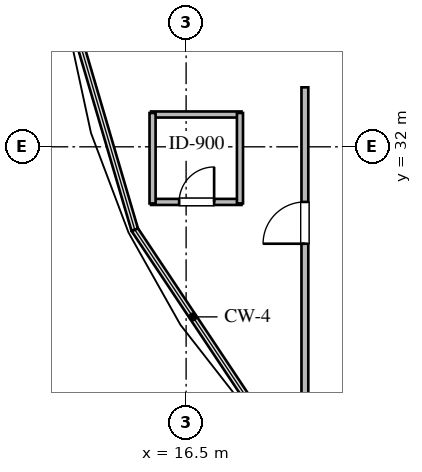
"""IFC4 building model, lengths in metres.
Left out: names, types, materials, properties, quantities, classifications, styles, units other than length and angle.
Written with IfcOpenShell. Run it as: python <this file> out.ifc"""

import sys

from ifc_helpers import new_model, si_unit, direction, frame, frame_2d, origin, place, context, subcontext, project, spatial, rectangle, extrude, element, fill, save


model = new_model("IFC4")
c1 = context("Model", 3, precision=1e-05, world=origin(), true_north=direction((0.0, 1.0)))
c2 = subcontext(c1, "Body", "Model", "MODEL_VIEW")
j1 = project(units=[si_unit("LENGTHUNIT", "METRE"), si_unit("PLANEANGLEUNIT", "RADIAN")], contexts=[c1])
p1 = place(None, origin())
s1 = spatial("IfcSite", under=j1, at=p1, CompositionType="ELEMENT")
p2 = place(p1, origin())
s2 = spatial("IfcBuilding", under=s1, at=p2, CompositionType="ELEMENT")
p3 = place(p2, frame((0.0, 0.0, 199.2)))
s3 = spatial("IfcBuildingStorey", under=s2, at=p3, CompositionType="ELEMENT", Elevation=199.2)
p4 = place(p3, frame((15.577, 30.55, 0.0), z_axis=(0.0, 0.0, 1.0), x_axis=(1.0, 0.0, 0.0)))
e1 = element("IfcWall", 1, at=p4, inside=s3, PredefinedType="PLUMBINGWALL", context=c2, shape_type="SweptSolid", body=[
    extrude(rectangle(XDim=2.38, YDim=0.16, at=frame_2d((1.19, 0.0))), origin(), (0.0, 0.0, 1.0), 3.36),
])
p5 = place(p4, frame((0.74, 0.0, 0.0)))
e2 = element("IfcOpeningElement", 2, at=p5, cuts=e1, PredefinedType="OPENING", context=c2, shape_type="SweptSolid", body=[
    extrude(rectangle(XDim=0.92, YDim=2.1, at=frame_2d((0.46, 1.05))), frame((0.0, 0.09, 0.0), z_axis=(0.0, -1.0, 0.0), x_axis=(1.0, 0.0, 0.0)), (0.0, 0.0, 1.0), 0.18),
])
p6 = place(p3, frame((15.577, 32.85, 0.0), z_axis=(0.0, 0.0, 1.0), x_axis=(1.0, 0.0, 0.0)))
e3 = element("IfcWall", 3, at=p6, inside=s3, PredefinedType="PLUMBINGWALL", context=c2, shape_type="SweptSolid", body=[
    extrude(rectangle(XDim=2.38, YDim=0.16, at=frame_2d((1.19, 0.0))), origin(), (0.0, 0.0, 1.0), 3.36),
])
p7 = place(p3, frame((15.617, 30.51, 0.0), z_axis=(0.0, 0.0, 1.0), x_axis=(0.0, 1.0, 0.0)))
e4 = element("IfcWall", 4, at=p7, inside=s3, PredefinedType="PLUMBINGWALL", context=c2, shape_type="SweptSolid", body=[
    extrude(rectangle(XDim=2.38, YDim=0.16, at=frame_2d((1.19, 0.0))), origin(), (0.0, 0.0, 1.0), 3.36),
])
p8 = place(p3, frame((17.917, 30.51, 0.0), z_axis=(0.0, 0.0, 1.0), x_axis=(0.0, 1.0, 0.0)))
e5 = element("IfcWall", 5, at=p8, inside=s3, PredefinedType="PLUMBINGWALL", context=c2, shape_type="SweptSolid", body=[
    extrude(rectangle(XDim=2.38, YDim=0.16, at=frame_2d((1.19, 0.0))), origin(), (0.0, 0.0, 1.0), 2.817),
])
p9 = place(p3, frame((19.625, 24.06, 0.0), z_axis=(0.0, 0.0, 1.0), x_axis=(0.0, 1.0, 0.0)))
e6 = element("IfcWall", 6, at=p9, inside=s3, PredefinedType="PARTITIONING", context=c2, shape_type="SweptSolid", body=[
    extrude(rectangle(XDim=9.505, YDim=0.18, at=frame_2d((4.752, 0.0))), origin(), (0.0, 0.0, 1.0), 2.817),
])
p10 = place(p9, frame((5.39, 0.0, 0.0)))
e7 = element("IfcOpeningElement", 7, at=p10, cuts=e6, PredefinedType="OPENING", context=c2, shape_type="SweptSolid", body=[
    extrude(rectangle(XDim=1.1, YDim=2.1, at=frame_2d((0.55, 1.05))), frame((0.0, 0.1, 0.0), z_axis=(0.0, -1.0, 0.0), x_axis=(1.0, 0.0, 0.0)), (0.0, 0.0, 1.0), 0.2),
])
p11 = place(p5, origin())
e8 = element("IfcDoor", 8, at=p11, inside=s3, OperationType="SINGLE_SWING_RIGHT", PredefinedType="DOOR", context=c2, shape_type="SweptSolid", body=[
    extrude(rectangle(XDim=0.92, YDim=2.1, at=frame_2d((0.46, 1.05))), frame((0.0, 0.025, 0.0), z_axis=(0.0, -1.0, 0.0), x_axis=(1.0, 0.0, 0.0)), (0.0, 0.0, 1.0), 0.05),
])
fill(e2, e8)
p12 = place(p10, origin())
e9 = element("IfcDoor", 9, at=p12, inside=s3, OperationType="SINGLE_SWING_LEFT", PredefinedType="DOOR", context=c2, shape_type="SweptSolid", body=[
    extrude(rectangle(XDim=1.1, YDim=2.1, at=frame_2d((0.55, 1.05))), frame((0.0, 0.025, 0.0), z_axis=(0.0, -1.0, 0.0), x_axis=(1.0, 0.0, 0.0)), (0.0, 0.0, 1.0), 0.05),
])
fill(e7, e9)
save(model, sys.argv[1])
